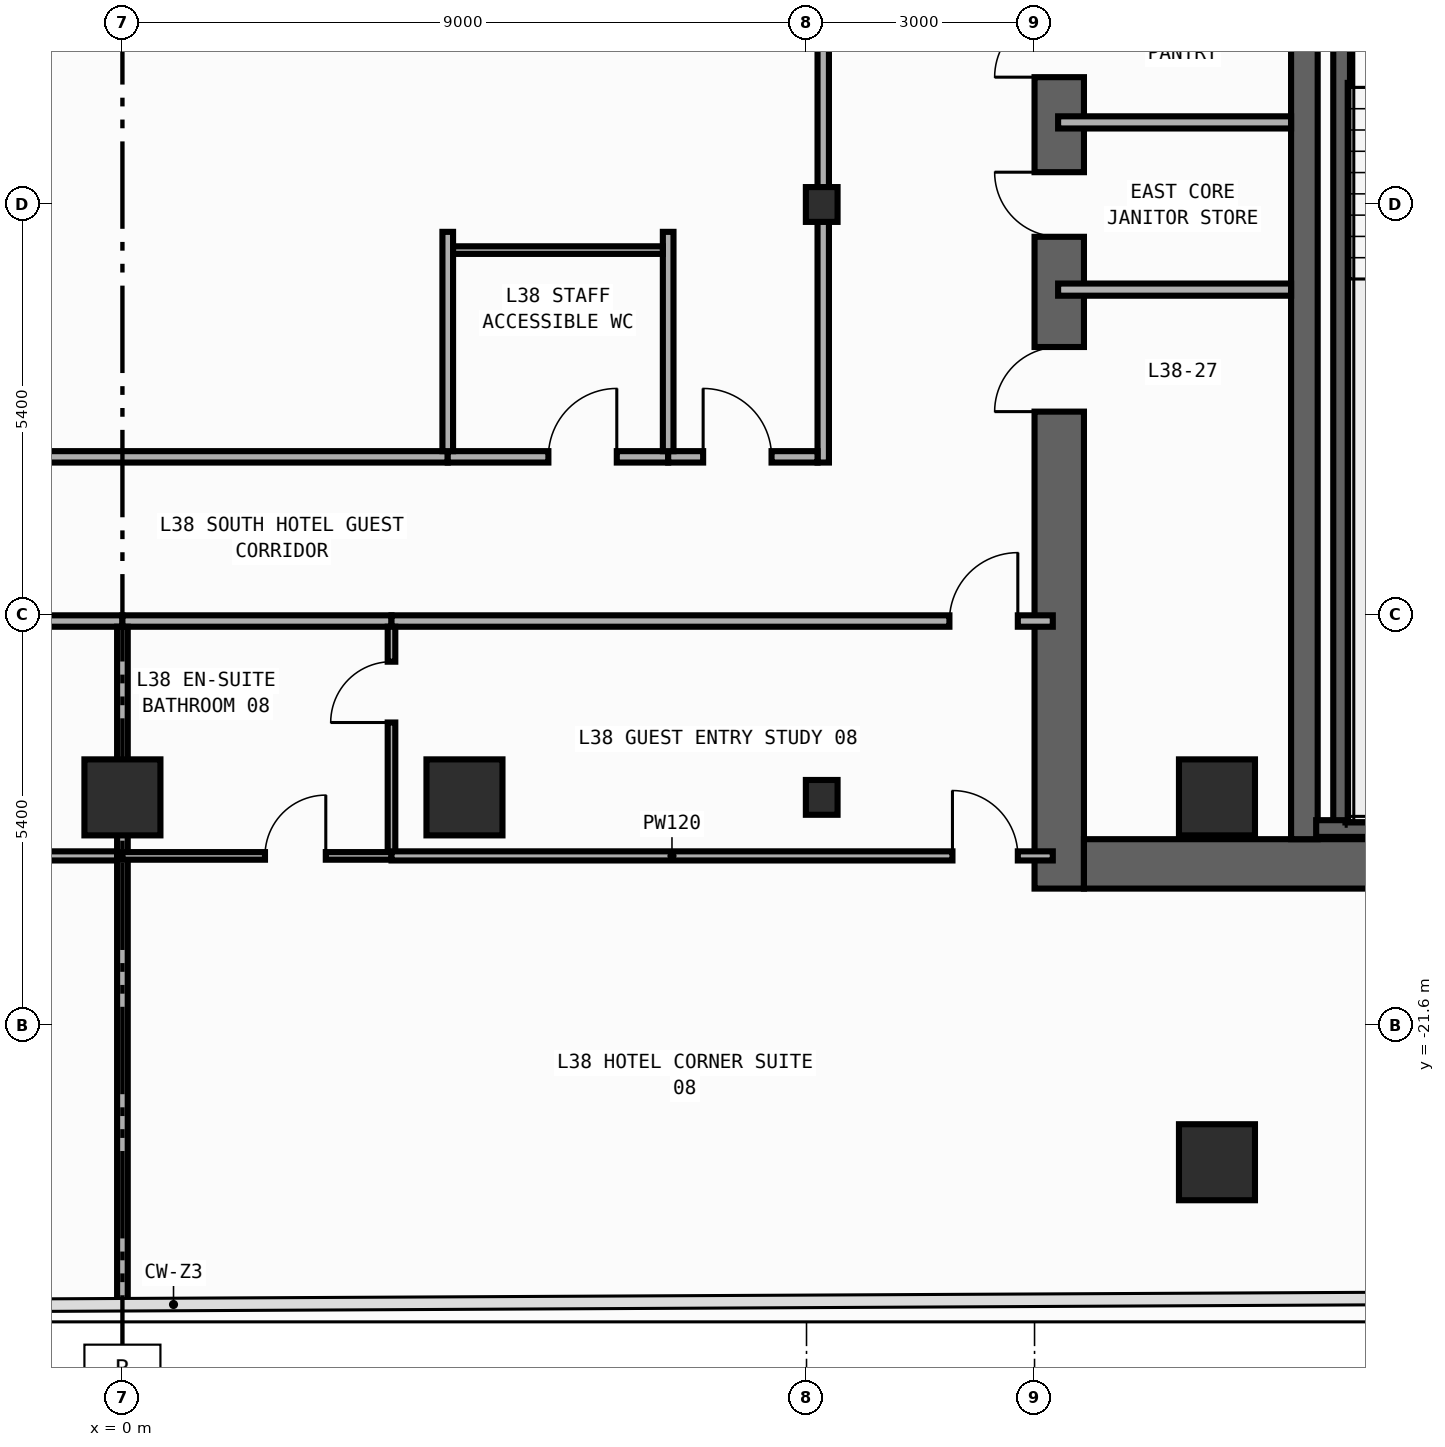
"""IFC4 building model, lengths in metres.
Left out: names, types, materials, properties, quantities, classifications, styles, units other than length and angle.
Written with IfcOpenShell. Run it as: python <this file> out.ifc"""

import sys

from ifc_helpers import new_model, si_unit, direction, frame, frame_2d, origin, origin_2d, place, context, subcontext, project, spatial, rectangle, i_section, extrude, element, fill, save


model = new_model("IFC4")
c1 = context("Model", 3, precision=1e-05, world=origin(), true_north=direction((0.0, 1.0)))
c2 = subcontext(c1, "Body", "Model", "MODEL_VIEW")
j1 = project(units=[si_unit("LENGTHUNIT", "METRE"), si_unit("PLANEANGLEUNIT", "RADIAN")], contexts=[c1])
p1 = place(None, origin())
s1 = spatial("IfcSite", under=j1, at=p1, CompositionType="ELEMENT")
p2 = place(p1, origin())
s2 = spatial("IfcBuilding", under=s1, at=p2, CompositionType="ELEMENT")
p3 = place(p2, frame((0.0, 0.0, 168.8)))
s3 = spatial("IfcBuildingStorey", under=s2, at=p3, CompositionType="ELEMENT", Elevation=168.8)
p4 = place(p3, frame((12.325, -19.8, 0.0), z_axis=(0.0, 0.0, 1.0), x_axis=(0.0, 1.0, 0.0)))
e1 = element("IfcWall", 1, at=p4, inside=s3, PredefinedType="SHEAR", context=c2, shape_type="SweptSolid", body=[
    extrude(rectangle(XDim=27.0, YDim=0.65, at=frame_2d((13.5, 0.0))), origin(), (0.0, 0.0, 1.0), 3.54),
])
p5 = place(p4, frame((23.05, 0.0, 0.0)))
e2 = element("IfcOpeningElement", 2, at=p5, cuts=e1, PredefinedType="OPENING", context=c2, shape_type="SweptSolid", body=[
    extrude(rectangle(XDim=1.1, YDim=2.2, at=frame_2d((0.55, 1.1))), frame((0.0, 0.335, 0.0), z_axis=(0.0, -1.0, 0.0), x_axis=(1.0, 0.0, 0.0)), (0.0, 0.0, 1.0), 0.67),
])
p6 = place(p4, frame((19.85, 0.0, 0.0)))
e3 = element("IfcOpeningElement", 3, at=p6, cuts=e1, PredefinedType="OPENING", context=c2, shape_type="SweptSolid", body=[
    extrude(rectangle(XDim=1.1, YDim=2.2, at=frame_2d((0.55, 1.1))), frame((0.0, 0.335, 0.0), z_axis=(0.0, -1.0, 0.0), x_axis=(1.0, 0.0, 0.0)), (0.0, 0.0, 1.0), 0.67),
])
p7 = place(p4, frame((16.65, 0.0, 0.0)))
e4 = element("IfcOpeningElement", 4, at=p7, cuts=e1, PredefinedType="OPENING", context=c2, shape_type="SweptSolid", body=[
    extrude(rectangle(XDim=1.1, YDim=2.2, at=frame_2d((0.55, 1.1))), frame((0.0, 0.335, 0.0), z_axis=(0.0, -1.0, 0.0), x_axis=(1.0, 0.0, 0.0)), (0.0, 0.0, 1.0), 0.67),
])
p8 = place(p4, frame((6.275, 0.0, 0.0)))
e5 = element("IfcOpeningElement", 5, at=p8, cuts=e1, PredefinedType="OPENING", context=c2, shape_type="SweptSolid", body=[
    extrude(rectangle(XDim=0.85, YDim=2.1, at=frame_2d((0.425, 1.05))), frame((0.0, 0.335, 0.0), z_axis=(0.0, -1.0, 0.0), x_axis=(1.0, 0.0, 0.0)), (0.0, 0.0, 1.0), 0.67),
])
p9 = place(p4, frame((8.575, 0.0, 0.0)))
e6 = element("IfcOpeningElement", 6, at=p9, cuts=e1, PredefinedType="OPENING", context=c2, shape_type="SweptSolid", body=[
    extrude(rectangle(XDim=0.85, YDim=2.1, at=frame_2d((0.425, 1.05))), frame((0.0, 0.335, 0.0), z_axis=(0.0, -1.0, 0.0), x_axis=(1.0, 0.0, 0.0)), (0.0, 0.0, 1.0), 0.67),
])
p10 = place(p4, frame((10.675, 0.0, 0.0)))
e7 = element("IfcOpeningElement", 7, at=p10, cuts=e1, PredefinedType="OPENING", context=c2, shape_type="SweptSolid", body=[
    extrude(rectangle(XDim=0.85, YDim=2.1, at=frame_2d((0.425, 1.05))), frame((0.0, 0.335, 0.0), z_axis=(0.0, -1.0, 0.0), x_axis=(1.0, 0.0, 0.0)), (0.0, 0.0, 1.0), 0.67),
])
p11 = place(p4, frame((12.725, 0.0, 0.0)))
e8 = element("IfcOpeningElement", 8, at=p11, cuts=e1, PredefinedType="OPENING", context=c2, shape_type="SweptSolid", body=[
    extrude(rectangle(XDim=1.15, YDim=2.2, at=frame_2d((0.575, 1.1))), frame((0.0, 0.335, 0.0), z_axis=(0.0, -1.0, 0.0), x_axis=(1.0, 0.0, 0.0)), (0.0, 0.0, 1.0), 0.67),
])
p12 = place(p4, frame((25.125, 0.0, 0.0)))
e9 = element("IfcOpeningElement", 9, at=p12, cuts=e1, PredefinedType="OPENING", context=c2, shape_type="SweptSolid", body=[
    extrude(rectangle(XDim=0.85, YDim=2.1, at=frame_2d((0.425, 1.05))), frame((0.0, 0.335, 0.0), z_axis=(0.0, -1.0, 0.0), x_axis=(1.0, 0.0, 0.0)), (0.0, 0.0, 1.0), 0.67),
])
p13 = place(p3, frame((12.65, -19.475, 0.0), z_axis=(0.0, 0.0, 1.0), x_axis=(1.0, 0.0, 0.0)))
e10 = element("IfcWall", 10, at=p13, inside=s3, PredefinedType="SHEAR", context=c2, shape_type="SweptSolid", body=[
    extrude(rectangle(XDim=7.1, YDim=0.65, at=frame_2d((3.55, 0.0))), origin(), (0.0, 0.0, 1.0), 3.54),
])
p14 = place(p3, frame((15.55, -19.15, 0.0), z_axis=(0.0, 0.0, 1.0), x_axis=(0.0, 1.0, 0.0)))
e11 = element("IfcWall", 11, at=p14, inside=s3, PredefinedType="SHEAR", context=c2, shape_type="SweptSolid", body=[
    extrude(rectangle(XDim=25.7, YDim=0.35, at=frame_2d((12.85, 0.0))), origin(), (0.0, 0.0, 1.0), 3.54),
])
p15 = place(p14, frame((12.075, 0.0, 0.0)))
e12 = element("IfcOpeningElement", 12, at=p15, cuts=e11, PredefinedType="OPENING", context=c2, shape_type="SweptSolid", body=[
    extrude(rectangle(XDim=1.15, YDim=2.2, at=frame_2d((0.575, 1.1))), frame((0.0, 0.185, 0.0), z_axis=(0.0, -1.0, 0.0), x_axis=(1.0, 0.0, 0.0)), (0.0, 0.0, 1.0), 0.37),
])
p16 = place(p14, frame((24.475, 0.0, 0.0)))
e13 = element("IfcOpeningElement", 13, at=p16, cuts=e11, PredefinedType="OPENING", context=c2, shape_type="SweptSolid", body=[
    extrude(rectangle(XDim=0.85, YDim=2.1, at=frame_2d((0.425, 1.05))), frame((0.0, 0.185, 0.0), z_axis=(0.0, -1.0, 0.0), x_axis=(1.0, 0.0, 0.0)), (0.0, 0.0, 1.0), 0.37),
])
p17 = place(p3, frame((16.04, -19.01, 0.0), z_axis=(0.0, 0.0, 1.0), x_axis=(0.0, 1.0, 0.0)))
e14 = element("IfcWall", 14, at=p17, inside=s3, PredefinedType="SHEAR", context=c2, shape_type="SweptSolid", body=[
    extrude(rectangle(XDim=11.42, YDim=0.22, at=frame_2d((5.71, 0.0))), origin(), (0.0, 0.0, 1.0), 3.54),
])
p18 = place(p3, frame((15.705, -19.01, 0.0), z_axis=(0.0, 0.0, 1.0), x_axis=(1.0, 0.0, 0.0)))
e15 = element("IfcWall", 15, at=p18, inside=s3, PredefinedType="SHEAR", context=c2, shape_type="SweptSolid", body=[
    extrude(rectangle(XDim=4.065, YDim=0.22, at=frame_2d((2.032, 0.0))), origin(), (0.0, 0.0, 1.0), 3.54),
])
for number, where, z_axis, x_axis in (
    (16, (9.2, -18.6, 0.0), (0.0, 0.0, 1.0), (1.0, 0.0, 0.0)),
    (17, (9.2, -10.8, 0.0), (0.0, 0.0, 1.0), (1.0, 0.0, 0.0)),
):
    element("IfcColumn", number, at=place(p3, frame(where, z_axis=z_axis, x_axis=x_axis)), inside=s3, PredefinedType="COLUMN", context=c2, shape_type="SweptSolid", body=[
        extrude(i_section(OverallWidth=0.417, OverallDepth=0.458, WebThickness=0.03, FlangeThickness=0.05, FilletRadius=0.022, at=origin_2d()), origin(), (0.0, 0.0, 1.0), 3.8),
    ])
for number, where, z_axis, x_axis in (
    (18, (14.4, -18.6, 0.0), (0.0, 0.0, 1.0), (1.0, 0.0, 0.0)),
    (19, (0.0, -18.6, 0.0), (0.0, 0.0, 1.0), (1.0, 0.0, 0.0)),
    (20, (4.5, -18.6, 0.0), (0.0, 0.0, 1.0), (1.0, 0.0, 0.0)),
    (21, (14.4, -23.4, 0.0), (0.0, 0.0, 1.0), (1.0, 0.0, 0.0)),
):
    element("IfcColumn", number, at=place(p3, frame(where, z_axis=z_axis, x_axis=x_axis)), inside=s3, PredefinedType="COLUMN", context=c2, shape_type="SweptSolid", body=[
        extrude(rectangle(XDim=1.0, YDim=1.0, at=origin_2d()), origin(), (0.0, 0.0, 1.0), 3.8),
    ])
for number, where, z_axis, x_axis in (
    (22, (12.31, -11.92, 0.0), (0.0, 0.0, 1.0), (1.0, 0.0, 0.0)),
    (23, (12.31, -9.72, 0.0), (0.0, 0.0, 1.0), (1.0, 0.0, 0.0)),
):
    element("IfcWall", number, at=place(p3, frame(where, z_axis=z_axis, x_axis=x_axis)), inside=s3, PredefinedType="PARTITIONING", context=c2, shape_type="SweptSolid", body=[
        extrude(rectangle(XDim=3.065, YDim=0.16, at=frame_2d((1.532, 0.0))), origin(), (0.0, 0.0, 1.0), 3.54),
    ])
p19 = place(p3, frame((9.22, -14.195, 0.0), z_axis=(0.0, 0.0, 1.0), x_axis=(0.0, 1.0, 0.0)))
e24 = element("IfcWall", 24, at=p19, inside=s3, PredefinedType="PARTITIONING", context=c2, shape_type="SweptSolid", body=[
    extrude(rectangle(XDim=10.595, YDim=0.15, at=frame_2d((5.297, 0.0))), origin(), (0.0, 0.0, 1.0), 2.952),
])
p20 = place(p19, frame((8.419, 0.0, 0.0)))
e25 = element("IfcOpeningElement", 25, at=p20, cuts=e24, PredefinedType="OPENING", context=c2, shape_type="SweptSolid", body=[
    extrude(rectangle(XDim=0.9, YDim=2.15, at=frame_2d((0.45, 1.075))), frame((0.0, 0.085, 0.0), z_axis=(0.0, -1.0, 0.0), x_axis=(1.0, 0.0, 0.0)), (0.0, 0.0, 1.0), 0.17),
])
p21 = place(p3, frame((-3.32, -14.12, 0.0), z_axis=(0.0, 0.0, 1.0), x_axis=(1.0, 0.0, 0.0)))
e26 = element("IfcWall", 26, at=p21, inside=s3, PredefinedType="PARTITIONING", context=c2, shape_type="SweptSolid", body=[
    extrude(rectangle(XDim=7.6, YDim=0.15, at=frame_2d((3.8, 0.0))), origin(), (0.0, 0.0, 1.0), 3.54),
])
p22 = place(p21, frame((0.667, 0.0, 0.0)))
e27 = element("IfcOpeningElement", 27, at=p22, cuts=e26, PredefinedType="OPENING", context=c2, shape_type="SweptSolid", body=[
    extrude(rectangle(XDim=0.9, YDim=2.15, at=frame_2d((0.45, 1.075))), frame((0.0, 0.085, 0.0), z_axis=(0.0, -1.0, 0.0), x_axis=(1.0, 0.0, 0.0)), (0.0, 0.0, 1.0), 0.17),
])
p23 = place(p3, frame((4.28, -14.12, 0.0), z_axis=(0.0, 0.0, 1.0), x_axis=(1.0, 0.0, 0.0)))
e28 = element("IfcWall", 28, at=p23, inside=s3, PredefinedType="PARTITIONING", context=c2, shape_type="SweptSolid", body=[
    extrude(rectangle(XDim=2.9, YDim=0.15, at=frame_2d((1.45, 0.0))), origin(), (0.0, 0.0, 1.0), 3.54),
])
p24 = place(p23, frame((1.324, 0.0, 0.0)))
e29 = element("IfcOpeningElement", 29, at=p24, cuts=e28, PredefinedType="OPENING", context=c2, shape_type="SweptSolid", body=[
    extrude(rectangle(XDim=0.9, YDim=2.15, at=frame_2d((0.45, 1.075))), frame((0.0, 0.085, 0.0), z_axis=(0.0, -1.0, 0.0), x_axis=(1.0, 0.0, 0.0)), (0.0, 0.0, 1.0), 0.17),
])
p25 = place(p3, frame((7.18, -14.12, 0.0), z_axis=(0.0, 0.0, 1.0), x_axis=(1.0, 0.0, 0.0)))
e30 = element("IfcWall", 30, at=p25, inside=s3, PredefinedType="PARTITIONING", context=c2, shape_type="SweptSolid", body=[
    extrude(rectangle(XDim=1.965, YDim=0.15, at=frame_2d((0.982, 0.0))), origin(), (0.0, 0.0, 1.0), 3.54),
])
p26 = place(p25, frame((0.46, 0.0, 0.0)))
e31 = element("IfcOpeningElement", 31, at=p26, cuts=e30, PredefinedType="OPENING", context=c2, shape_type="SweptSolid", body=[
    extrude(rectangle(XDim=0.9, YDim=2.15, at=frame_2d((0.45, 1.075))), frame((0.0, 0.085, 0.0), z_axis=(0.0, -1.0, 0.0), x_axis=(1.0, 0.0, 0.0)), (0.0, 0.0, 1.0), 0.17),
])
p27 = place(p3, frame((-10.86, -16.28, 0.0), z_axis=(0.0, 0.0, 1.0), x_axis=(1.0, 0.0, 0.0)))
e32 = element("IfcWall", 32, at=p27, inside=s3, PredefinedType="PARTITIONING", context=c2, shape_type="SweptSolid", body=[
    extrude(rectangle(XDim=10.86, YDim=0.15, at=frame_2d((5.43, 0.0))), origin(), (0.0, 0.0, 1.0), 3.54),
])
p28 = place(p27, frame((3.272, 0.0, 0.0)))
e33 = element("IfcOpeningElement", 33, at=p28, cuts=e32, PredefinedType="OPENING", context=c2, shape_type="SweptSolid", body=[
    extrude(rectangle(XDim=0.9, YDim=2.15, at=frame_2d((0.45, 1.075))), frame((0.0, 0.085, 0.0), z_axis=(0.0, -1.0, 0.0), x_axis=(1.0, 0.0, 0.0)), (0.0, 0.0, 1.0), 0.17),
])
p29 = place(p3, frame((0.0, -16.28, 0.0), z_axis=(0.0, 0.0, 1.0), x_axis=(1.0, 0.0, 0.0)))
e34 = element("IfcWall", 34, at=p29, inside=s3, PredefinedType="PARTITIONING", context=c2, shape_type="SweptSolid", body=[
    extrude(rectangle(XDim=3.54, YDim=0.15, at=frame_2d((1.77, 0.0))), origin(), (0.0, 0.0, 1.0), 3.54),
])
p30 = place(p3, frame((3.54, -16.28, 0.0), z_axis=(0.0, 0.0, 1.0), x_axis=(1.0, 0.0, 0.0)))
e35 = element("IfcWall", 35, at=p30, inside=s3, PredefinedType="PARTITIONING", context=c2, shape_type="SweptSolid", body=[
    extrude(rectangle(XDim=8.7, YDim=0.15, at=frame_2d((4.35, 0.0))), origin(), (0.0, 0.0, 1.0), 3.54),
])
p31 = place(p30, frame((7.34, 0.0, 0.0)))
e36 = element("IfcOpeningElement", 36, at=p31, cuts=e35, PredefinedType="OPENING", context=c2, shape_type="SweptSolid", body=[
    extrude(rectangle(XDim=0.9, YDim=2.15, at=frame_2d((0.45, 1.075))), frame((0.0, 0.085, 0.0), z_axis=(0.0, -1.0, 0.0), x_axis=(1.0, 0.0, 0.0)), (0.0, 0.0, 1.0), 0.17),
])
for number, where, z_axis, x_axis in (
    (37, (4.28, -14.045, 0.0), (0.0, 0.0, 1.0), (0.0, 1.0, 0.0)),
    (38, (7.18, -14.045, 0.0), (0.0, 0.0, 1.0), (0.0, 1.0, 0.0)),
):
    element("IfcWall", number, at=place(p3, frame(where, z_axis=z_axis, x_axis=x_axis)), inside=s3, PredefinedType="PARTITIONING", context=c2, shape_type="SweptSolid", body=[
        extrude(rectangle(XDim=2.885, YDim=0.14, at=frame_2d((1.442, 0.0))), origin(), (0.0, 0.0, 1.0), 3.54),
    ])
p32 = place(p3, frame((-10.86, -19.37, 0.0), z_axis=(0.0, 0.0, 1.0), x_axis=(1.0, 0.0, 0.0)))
e39 = element("IfcWall", 39, at=p32, inside=s3, PredefinedType="PARTITIONING", context=c2, shape_type="SweptSolid", body=[
    extrude(rectangle(XDim=10.86, YDim=0.12, at=frame_2d((5.43, 0.0))), origin(), (0.0, 0.0, 1.0), 3.54),
])
p33 = place(p32, frame((3.487, 0.0, 0.0)))
e40 = element("IfcOpeningElement", 40, at=p33, cuts=e39, PredefinedType="OPENING", context=c2, shape_type="SweptSolid", body=[
    extrude(rectangle(XDim=0.86, YDim=2.15, at=frame_2d((0.43, 1.075))), frame((0.0, 0.07, 0.0), z_axis=(0.0, -1.0, 0.0), x_axis=(1.0, 0.0, 0.0)), (0.0, 0.0, 1.0), 0.14),
])
p34 = place(p3, frame((0.0, -19.37, 0.0), z_axis=(0.0, 0.0, 1.0), x_axis=(0.0, 1.0, 0.0)))
e41 = element("IfcWall", 41, at=p34, inside=s3, PredefinedType="PARTITIONING", context=c2, shape_type="SweptSolid", body=[
    extrude(rectangle(XDim=3.015, YDim=0.14, at=frame_2d((1.508, 0.0))), origin(), (0.0, 0.0, 1.0), 3.54),
])
p35 = place(p3, frame((0.0, -25.27, 0.0), z_axis=(0.0, 0.0, 1.0), x_axis=(0.0, 1.0, 0.0)))
e42 = element("IfcWall", 42, at=p35, inside=s3, PredefinedType="PARTITIONING", context=c2, shape_type="SweptSolid", body=[
    extrude(rectangle(XDim=5.9, YDim=0.14, at=frame_2d((2.95, 0.0))), origin(), (0.0, 0.0, 1.0), 3.54),
])
p36 = place(p3, frame((3.54, -19.32, 0.0), z_axis=(0.0, 0.0, 1.0), x_axis=(0.0, 1.0, 0.0)))
e43 = element("IfcWall", 43, at=p36, inside=s3, PredefinedType="PARTITIONING", context=c2, shape_type="SweptSolid", body=[
    extrude(rectangle(XDim=2.965, YDim=0.1, at=frame_2d((1.482, 0.0))), origin(), (0.0, 0.0, 1.0), 3.54),
])
p37 = place(p36, frame((1.705, 0.0, 0.0)))
e44 = element("IfcOpeningElement", 44, at=p37, cuts=e43, PredefinedType="OPENING", context=c2, shape_type="SweptSolid", body=[
    extrude(rectangle(XDim=0.8, YDim=2.1, at=frame_2d((0.4, 1.05))), frame((0.0, 0.06, 0.0), z_axis=(0.0, -1.0, 0.0), x_axis=(1.0, 0.0, 0.0)), (0.0, 0.0, 1.0), 0.12),
])
p38 = place(p3, frame((0.0, -19.37, 0.0), z_axis=(0.0, 0.0, 1.0), x_axis=(1.0, 0.0, 0.0)))
e45 = element("IfcWall", 45, at=p38, inside=s3, PredefinedType="PARTITIONING", context=c2, shape_type="SweptSolid", body=[
    extrude(rectangle(XDim=3.54, YDim=0.1, at=frame_2d((1.77, 0.0))), origin(), (0.0, 0.0, 1.0), 3.54),
])
p39 = place(p38, frame((1.875, 0.0, 0.0)))
e46 = element("IfcOpeningElement", 46, at=p39, cuts=e45, PredefinedType="OPENING", context=c2, shape_type="SweptSolid", body=[
    extrude(rectangle(XDim=0.8, YDim=2.1, at=frame_2d((0.4, 1.05))), frame((0.0, 0.06, 0.0), z_axis=(0.0, -1.0, 0.0), x_axis=(1.0, 0.0, 0.0)), (0.0, 0.0, 1.0), 0.12),
])
p40 = place(p3, frame((3.54, -19.37, 0.0), z_axis=(0.0, 0.0, 1.0), x_axis=(1.0, 0.0, 0.0)))
e47 = element("IfcWall", 47, at=p40, inside=s3, PredefinedType="PARTITIONING", context=c2, shape_type="SweptSolid", body=[
    extrude(rectangle(XDim=8.7, YDim=0.12, at=frame_2d((4.35, 0.0))), origin(), (0.0, 0.0, 1.0), 3.54),
])
p41 = place(p40, frame((7.38, 0.0, 0.0)))
e48 = element("IfcOpeningElement", 48, at=p41, cuts=e47, PredefinedType="OPENING", context=c2, shape_type="SweptSolid", body=[
    extrude(rectangle(XDim=0.86, YDim=2.15, at=frame_2d((0.43, 1.075))), frame((0.0, 0.07, 0.0), z_axis=(0.0, -1.0, 0.0), x_axis=(1.0, 0.0, 0.0)), (0.0, 0.0, 1.0), 0.14),
])
p42 = place(p3, frame((4.35, -11.4, 0.0), z_axis=(0.0, 0.0, 1.0), x_axis=(1.0, 0.0, 0.0)))
e49 = element("IfcWall", 49, at=p42, inside=s3, PredefinedType="PARTITIONING", context=c2, shape_type="SweptSolid", body=[
    extrude(rectangle(XDim=2.76, YDim=0.1, at=frame_2d((1.38, 0.0))), origin(), (0.0, 0.0, 1.0), 3.54),
])
p43 = place(p8, origin())
e50 = element("IfcDoor", 50, at=p43, inside=s3, OperationType="SINGLE_SWING_LEFT", PredefinedType="DOOR", context=c2, shape_type="SweptSolid", body=[
    extrude(rectangle(XDim=0.85, YDim=2.1, at=frame_2d((0.425, 1.05))), frame((0.0, 0.025, 0.0), z_axis=(0.0, -1.0, 0.0), x_axis=(1.0, 0.0, 0.0)), (0.0, 0.0, 1.0), 0.05),
])
fill(e5, e50)
p44 = place(p9, origin())
e51 = element("IfcDoor", 51, at=p44, inside=s3, OperationType="SINGLE_SWING_RIGHT", PredefinedType="DOOR", context=c2, shape_type="SweptSolid", body=[
    extrude(rectangle(XDim=0.85, YDim=2.1, at=frame_2d((0.425, 1.05))), frame((0.0, 0.025, 0.0), z_axis=(0.0, -1.0, 0.0), x_axis=(1.0, 0.0, 0.0)), (0.0, 0.0, 1.0), 0.05),
])
fill(e6, e51)
p45 = place(p10, origin())
e52 = element("IfcDoor", 52, at=p45, inside=s3, OperationType="SINGLE_SWING_LEFT", PredefinedType="DOOR", context=c2, shape_type="SweptSolid", body=[
    extrude(rectangle(XDim=0.85, YDim=2.1, at=frame_2d((0.425, 1.05))), frame((0.0, 0.025, 0.0), z_axis=(0.0, -1.0, 0.0), x_axis=(1.0, 0.0, 0.0)), (0.0, 0.0, 1.0), 0.05),
])
fill(e7, e52)
p46 = place(p24, origin())
e53 = element("IfcDoor", 53, at=p46, inside=s3, OperationType="SINGLE_SWING_RIGHT", PredefinedType="DOOR", context=c2, shape_type="SweptSolid", body=[
    extrude(rectangle(XDim=0.9, YDim=2.15, at=frame_2d((0.45, 1.075))), frame((0.0, 0.025, 0.0), z_axis=(0.0, -1.0, 0.0), x_axis=(1.0, 0.0, 0.0)), (0.0, 0.0, 1.0), 0.05),
])
fill(e29, e53)
p47 = place(p26, origin())
e54 = element("IfcDoor", 54, at=p47, inside=s3, OperationType="SINGLE_SWING_LEFT", PredefinedType="DOOR", context=c2, shape_type="SweptSolid", body=[
    extrude(rectangle(XDim=0.9, YDim=2.15, at=frame_2d((0.45, 1.075))), frame((0.0, 0.025, 0.0), z_axis=(0.0, -1.0, 0.0), x_axis=(1.0, 0.0, 0.0)), (0.0, 0.0, 1.0), 0.05),
])
fill(e31, e54)
p48 = place(p31, origin())
e55 = element("IfcDoor", 55, at=p48, inside=s3, OperationType="SINGLE_SWING_RIGHT", PredefinedType="DOOR", context=c2, shape_type="SweptSolid", body=[
    extrude(rectangle(XDim=0.9, YDim=2.15, at=frame_2d((0.45, 1.075))), frame((0.0, 0.025, 0.0), z_axis=(0.0, -1.0, 0.0), x_axis=(1.0, 0.0, 0.0)), (0.0, 0.0, 1.0), 0.05),
])
fill(e36, e55)
p49 = place(p37, origin())
e56 = element("IfcDoor", 56, at=p49, inside=s3, OperationType="SINGLE_SWING_LEFT", PredefinedType="DOOR", context=c2, shape_type="SweptSolid", body=[
    extrude(rectangle(XDim=0.8, YDim=2.1, at=frame_2d((0.4, 1.05))), frame((0.0, 0.025, 0.0), z_axis=(0.0, -1.0, 0.0), x_axis=(1.0, 0.0, 0.0)), (0.0, 0.0, 1.0), 0.05),
])
fill(e44, e56)
p50 = place(p39, origin())
e57 = element("IfcDoor", 57, at=p50, inside=s3, OperationType="SINGLE_SWING_RIGHT", PredefinedType="DOOR", context=c2, shape_type="SweptSolid", body=[
    extrude(rectangle(XDim=0.8, YDim=2.1, at=frame_2d((0.4, 1.05))), frame((0.0, 0.025, 0.0), z_axis=(0.0, -1.0, 0.0), x_axis=(1.0, 0.0, 0.0)), (0.0, 0.0, 1.0), 0.05),
])
fill(e46, e57)
p51 = place(p41, origin())
e58 = element("IfcDoor", 58, at=p51, inside=s3, OperationType="SINGLE_SWING_LEFT", PredefinedType="DOOR", context=c2, shape_type="SweptSolid", body=[
    extrude(rectangle(XDim=0.86, YDim=2.15, at=frame_2d((0.43, 1.075))), frame((0.0, 0.025, 0.0), z_axis=(0.0, -1.0, 0.0), x_axis=(1.0, 0.0, 0.0)), (0.0, 0.0, 1.0), 0.05),
])
fill(e48, e58)
save(model, sys.argv[1])
